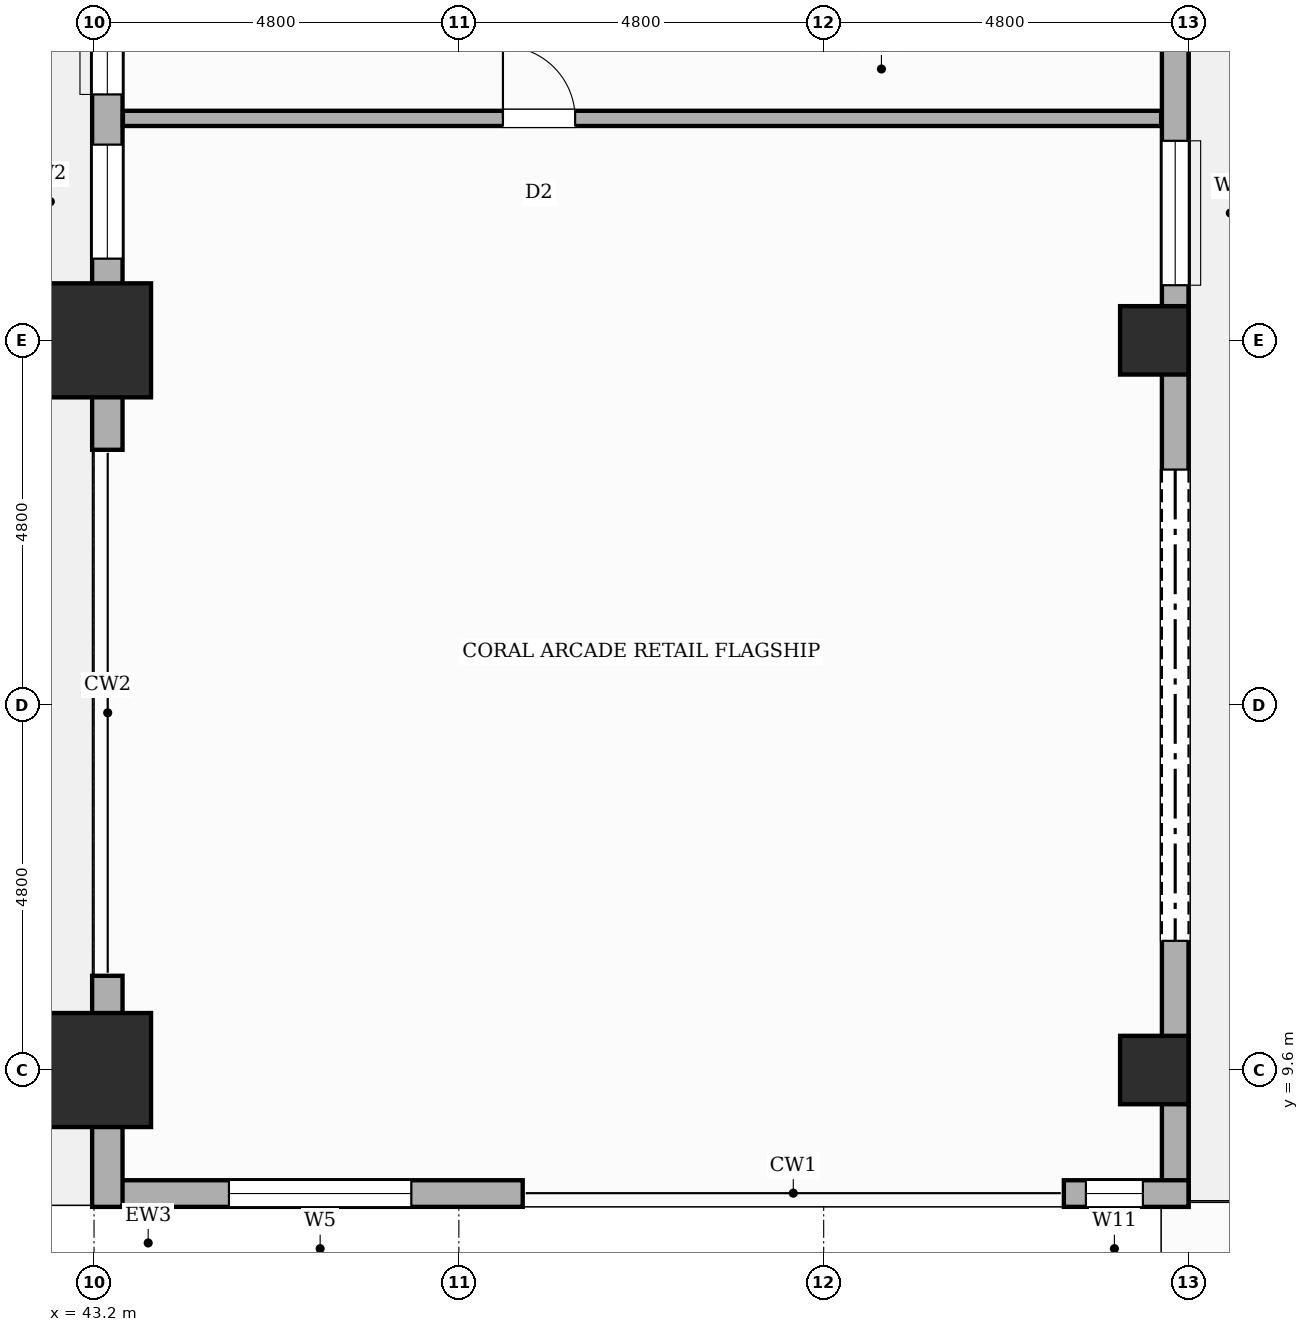
"""IFC4 building model, lengths in metres.
Left out: names, types, materials, properties, quantities, classifications, styles, units other than length and angle.
Written with IfcOpenShell. Run it as: python <this file> out.ifc"""

import sys

from ifc_helpers import new_model, si_unit, direction, frame, frame_2d, origin, origin_2d, place, context, subcontext, project, spatial, rectangle, circle, extrude, element, fill, save


model = new_model("IFC4")
c1 = context("Model", 3, precision=1e-05, world=origin(), true_north=direction((0.0, 1.0)))
c2 = subcontext(c1, "Body", "Model", "MODEL_VIEW")
j1 = project(units=[si_unit("LENGTHUNIT", "METRE"), si_unit("PLANEANGLEUNIT", "RADIAN")], contexts=[c1])
p1 = place(None, origin())
s1 = spatial("IfcSite", under=j1, at=p1, CompositionType="ELEMENT")
p2 = place(p1, origin())
s2 = spatial("IfcBuilding", under=s1, at=p2, CompositionType="ELEMENT")
p3 = place(p2, origin())
s3 = spatial("IfcBuildingStorey", under=s2, at=p3, CompositionType="ELEMENT", Elevation=0.0)
for number, where, z_axis, x_axis in (
    (1, (43.2, 9.6, 0.0), (0.0, 0.0, 1.0), (1.0, 0.0, 0.0)),
    (2, (43.2, 19.2, 0.0), (0.0, 0.0, 1.0), (1.0, 0.0, 0.0)),
):
    element("IfcColumn", number, at=place(p3, frame(where, z_axis=z_axis, x_axis=x_axis)), inside=s3, PredefinedType="USERDEFINED", context=c2, shape_type="SweptSolid", body=[
        extrude(rectangle(XDim=1.5, YDim=1.5, at=origin_2d()), origin(), (0.0, 0.0, 1.0), 5.2),
    ])
for number, where, z_axis, x_axis in (
    (3, (57.15, 9.6, 0.0), (0.0, 0.0, 1.0), (1.0, 0.0, 0.0)),
    (4, (57.15, 19.2, 0.0), (0.0, 0.0, 1.0), (1.0, 0.0, 0.0)),
):
    element("IfcColumn", number, at=place(p3, frame(where, z_axis=z_axis, x_axis=x_axis)), inside=s3, PredefinedType="COLUMN", context=c2, shape_type="SweptSolid", body=[
        extrude(circle(Radius=0.45, at=origin_2d()), origin(), (0.0, 0.0, 1.0), 5.2),
    ])
p4 = place(p3, frame((57.425, 48.0, 0.0), z_axis=(0.0, 0.0, 1.0), x_axis=(0.0, -1.0, 0.0)))
e5 = element("IfcWall", 5, at=p4, inside=s3, PredefinedType="STANDARD", context=c2, shape_type="SweptSolid", body=[
    extrude(rectangle(XDim=40.2, YDim=0.35, at=frame_2d((20.1, 0.0))), origin(), (0.0, 0.0, 1.0), 3.97),
])
p5 = place(p4, frame((30.5, 0.0, 0.0)))
e6 = element("IfcOpeningElement", 6, at=p5, cuts=e5, PredefinedType="OPENING", context=c2, shape_type="SweptSolid", body=[
    extrude(rectangle(XDim=6.2, YDim=3.4, at=frame_2d((3.1, 1.7))), frame((0.0, 0.185, 0.0), z_axis=(0.0, -1.0, 0.0), x_axis=(1.0, 0.0, 0.0)), (0.0, 0.0, 1.0), 0.37),
])
p6 = place(p4, frame((21.1, 0.0, 0.0)))
e7 = element("IfcOpeningElement", 7, at=p6, cuts=e5, PredefinedType="OPENING", context=c2, shape_type="SweptSolid", body=[
    extrude(rectangle(XDim=2.2, YDim=2.45, at=frame_2d((1.1, 1.225))), frame((0.0, 0.185, 0.0), z_axis=(0.0, -1.0, 0.0), x_axis=(1.0, 0.0, 0.0)), (0.0, 0.0, 1.0), 0.37),
])
p7 = place(p4, frame((12.2, 0.0, 0.85)))
e8 = element("IfcOpeningElement", 8, at=p7, cuts=e5, PredefinedType="OPENING", context=c2, shape_type="SweptSolid", body=[
    extrude(rectangle(XDim=1.5, YDim=2.1, at=frame_2d((0.75, 1.05))), frame((0.0, 0.185, 0.0), z_axis=(0.0, -1.0, 0.0), x_axis=(1.0, 0.0, 0.0)), (0.0, 0.0, 1.0), 0.37),
])
p8 = place(p4, frame((10.375, 0.0, 0.85)))
e9 = element("IfcOpeningElement", 9, at=p8, cuts=e5, PredefinedType="OPENING", context=c2, shape_type="SweptSolid", body=[
    extrude(rectangle(XDim=1.2, YDim=1.8, at=frame_2d((0.6, 0.9))), frame((0.0, 0.185, 0.0), z_axis=(0.0, -1.0, 0.0), x_axis=(1.0, 0.0, 0.0)), (0.0, 0.0, 1.0), 0.37),
])
p9 = place(p4, frame((1.675, 0.0, 0.85)))
e10 = element("IfcOpeningElement", 10, at=p9, cuts=e5, PredefinedType="OPENING", context=c2, shape_type="SweptSolid", body=[
    extrude(rectangle(XDim=1.9, YDim=2.6, at=frame_2d((0.95, 1.3))), frame((0.0, 0.185, 0.0), z_axis=(0.0, -1.0, 0.0), x_axis=(1.0, 0.0, 0.0)), (0.0, 0.0, 1.0), 0.37),
])
p10 = place(p4, frame((26.175, 0.0, 0.85)))
e11 = element("IfcOpeningElement", 11, at=p10, cuts=e5, PredefinedType="OPENING", context=c2, shape_type="SweptSolid", body=[
    extrude(rectangle(XDim=1.9, YDim=2.6, at=frame_2d((0.95, 1.3))), frame((0.0, 0.185, 0.0), z_axis=(0.0, -1.0, 0.0), x_axis=(1.0, 0.0, 0.0)), (0.0, 0.0, 1.0), 0.37),
])
p11 = place(p3, frame((57.6, 7.975, 0.0), z_axis=(0.0, 0.0, 1.0), x_axis=(-1.0, 0.0, 0.0)))
e12 = element("IfcWall", 12, at=p11, inside=s3, PredefinedType="STANDARD", context=c2, shape_type="SweptSolid", body=[
    extrude(rectangle(XDim=1.64, YDim=0.35, at=frame_2d((0.82, 0.0))), origin(), (0.0, 0.0, 1.0), 4.89),
])
p12 = place(p11, frame((0.6, 0.0, 0.45)))
e13 = element("IfcOpeningElement", 13, at=p12, cuts=e12, PredefinedType="OPENING", context=c2, shape_type="SweptSolid", body=[
    extrude(rectangle(XDim=0.75, YDim=1.8, at=frame_2d((0.375, 0.9))), frame((0.0, 0.185, 0.0), z_axis=(0.0, -1.0, 0.0), x_axis=(1.0, 0.0, 0.0)), (0.0, 0.0, 1.0), 0.37),
])
p13 = place(p3, frame((48.84, 7.975, 0.0), z_axis=(0.0, 0.0, 1.0), x_axis=(-1.0, 0.0, 0.0)))
e14 = element("IfcWall", 14, at=p13, inside=s3, PredefinedType="STANDARD", context=c2, shape_type="SweptSolid", body=[
    extrude(rectangle(XDim=5.64, YDim=0.35, at=frame_2d((2.82, 0.0))), origin(), (0.0, 0.0, 1.0), 4.89),
])
p14 = place(p13, frame((1.465, 0.0, 0.85)))
e15 = element("IfcOpeningElement", 15, at=p14, cuts=e14, PredefinedType="OPENING", context=c2, shape_type="SweptSolid", body=[
    extrude(rectangle(XDim=2.4, YDim=3.2, at=frame_2d((1.2, 1.6))), frame((0.0, 0.185, 0.0), z_axis=(0.0, -1.0, 0.0), x_axis=(1.0, 0.0, 0.0)), (0.0, 0.0, 1.0), 0.37),
])
p15 = place(p3, frame((43.375, 7.8, 0.0), z_axis=(0.0, 0.0, 1.0), x_axis=(0.0, 1.0, 0.0)))
e16 = element("IfcWall", 16, at=p15, inside=s3, PredefinedType="SOLIDWALL", context=c2, shape_type="SweptSolid", body=[
    extrude(rectangle(XDim=3.04, YDim=0.4, at=frame_2d((1.52, 0.0))), origin(), (0.0, 0.0, 1.0), 3.97),
])
p16 = place(p3, frame((43.375, 17.76, 0.0), z_axis=(0.0, 0.0, 1.0), x_axis=(0.0, 1.0, 0.0)))
e17 = element("IfcWall", 17, at=p16, inside=s3, PredefinedType="SOLIDWALL", context=c2, shape_type="SweptSolid", body=[
    extrude(rectangle(XDim=30.24, YDim=0.4, at=frame_2d((15.12, 0.0))), origin(), (0.0, 0.0, 1.0), 3.97),
])
p17 = place(p16, frame((6.94, 0.0, 0.0)))
e18 = element("IfcOpeningElement", 18, at=p17, cuts=e17, PredefinedType="OPENING", context=c2, shape_type="SweptSolid", body=[
    extrude(rectangle(XDim=2.2, YDim=2.45, at=frame_2d((1.1, 1.225))), frame((0.0, 0.21, 0.0), z_axis=(0.0, -1.0, 0.0), x_axis=(1.0, 0.0, 0.0)), (0.0, 0.0, 1.0), 0.42),
])
p18 = place(p16, frame((4.675, 0.0, 0.85)))
e19 = element("IfcOpeningElement", 19, at=p18, cuts=e17, PredefinedType="OPENING", context=c2, shape_type="SweptSolid", body=[
    extrude(rectangle(XDim=1.9, YDim=2.6, at=frame_2d((0.95, 1.3))), frame((0.0, 0.21, 0.0), z_axis=(0.0, -1.0, 0.0), x_axis=(1.0, 0.0, 0.0)), (0.0, 0.0, 1.0), 0.42),
])
p19 = place(p16, frame((2.515, 0.0, 0.85)))
e20 = element("IfcOpeningElement", 20, at=p19, cuts=e17, PredefinedType="OPENING", context=c2, shape_type="SweptSolid", body=[
    extrude(rectangle(XDim=1.5, YDim=2.1, at=frame_2d((0.75, 1.05))), frame((0.0, 0.21, 0.0), z_axis=(0.0, -1.0, 0.0), x_axis=(1.0, 0.0, 0.0)), (0.0, 0.0, 1.0), 0.42),
])
p20 = place(p3, frame((43.58, 22.12, 0.0), z_axis=(0.0, 0.0, 1.0), x_axis=(1.0, 0.0, 0.0)))
e21 = element("IfcWall", 21, at=p20, inside=s3, PredefinedType="SOLIDWALL", context=c2, shape_type="SweptSolid", body=[
    extrude(rectangle(XDim=13.66, YDim=0.2, at=frame_2d((6.83, 0.0))), origin(), (0.0, 0.0, 1.0), 4.89),
])
p21 = place(p20, frame((5.0, 0.0, 0.0)))
e22 = element("IfcOpeningElement", 22, at=p21, cuts=e21, PredefinedType="OPENING", context=c2, shape_type="SweptSolid", body=[
    extrude(rectangle(XDim=0.95, YDim=2.15, at=frame_2d((0.475, 1.075))), frame((0.0, 0.11, 0.0), z_axis=(0.0, -1.0, 0.0), x_axis=(1.0, 0.0, 0.0)), (0.0, 0.0, 1.0), 0.22),
])
p22 = place(p5, origin())
e23 = element("IfcDoor", 23, at=p22, inside=s3, OperationType="ROLLINGUP", PredefinedType="GATE", context=c2, shape_type="SweptSolid", body=[
    extrude(rectangle(XDim=6.2, YDim=3.4, at=frame_2d((3.1, 1.7))), frame((0.0, 0.025, 0.0), z_axis=(0.0, -1.0, 0.0), x_axis=(1.0, 0.0, 0.0)), (0.0, 0.0, 1.0), 0.05),
])
fill(e6, e23)
p23 = place(p10, origin())
e24 = element("IfcWindow", 24, at=p23, inside=s3, PartitioningType="SINGLE_PANEL", PredefinedType="WINDOW", context=c2, shape_type="SweptSolid", body=[
    extrude(rectangle(XDim=1.9, YDim=2.6, at=frame_2d((0.95, 1.3))), frame((0.0, 0.03, 0.0), z_axis=(0.0, -1.0, 0.0), x_axis=(1.0, 0.0, 0.0)), (0.0, 0.0, 1.0), 0.06),
])
fill(e11, e24)
p24 = place(p12, origin())
e25 = element("IfcWindow", 25, at=p24, inside=s3, PartitioningType="SINGLE_PANEL", PredefinedType="WINDOW", context=c2, shape_type="SweptSolid", body=[
    extrude(rectangle(XDim=0.75, YDim=1.8, at=frame_2d((0.375, 0.9))), frame((0.0, 0.03, 0.0), z_axis=(0.0, -1.0, 0.0), x_axis=(1.0, 0.0, 0.0)), (0.0, 0.0, 1.0), 0.06),
])
fill(e13, e25)
p25 = place(p14, origin())
e26 = element("IfcWindow", 26, at=p25, inside=s3, PartitioningType="SINGLE_PANEL", PredefinedType="WINDOW", context=c2, shape_type="SweptSolid", body=[
    extrude(rectangle(XDim=2.4, YDim=3.2, at=frame_2d((1.2, 1.6))), frame((0.0, 0.03, 0.0), z_axis=(0.0, -1.0, 0.0), x_axis=(1.0, 0.0, 0.0)), (0.0, 0.0, 1.0), 0.06),
])
fill(e15, e26)
p26 = place(p18, origin())
e27 = element("IfcWindow", 27, at=p26, inside=s3, PartitioningType="SINGLE_PANEL", PredefinedType="WINDOW", context=c2, shape_type="SweptSolid", body=[
    extrude(rectangle(XDim=1.9, YDim=2.6, at=frame_2d((0.95, 1.3))), frame((0.0, 0.03, 0.0), z_axis=(0.0, -1.0, 0.0), x_axis=(1.0, 0.0, 0.0)), (0.0, 0.0, 1.0), 0.06),
])
fill(e19, e27)
p27 = place(p19, origin())
e28 = element("IfcWindow", 28, at=p27, inside=s3, PartitioningType="SINGLE_PANEL", PredefinedType="WINDOW", context=c2, shape_type="SweptSolid", body=[
    extrude(rectangle(XDim=1.5, YDim=2.1, at=frame_2d((0.75, 1.05))), frame((0.0, 0.03, 0.0), z_axis=(0.0, -1.0, 0.0), x_axis=(1.0, 0.0, 0.0)), (0.0, 0.0, 1.0), 0.06),
])
fill(e20, e28)
p28 = place(p21, origin())
e29 = element("IfcDoor", 29, at=p28, inside=s3, OperationType="SINGLE_SWING_LEFT", PredefinedType="DOOR", context=c2, shape_type="SweptSolid", body=[
    extrude(rectangle(XDim=0.95, YDim=2.15, at=frame_2d((0.475, 1.075))), frame((0.0, 0.025, 0.0), z_axis=(0.0, -1.0, 0.0), x_axis=(1.0, 0.0, 0.0)), (0.0, 0.0, 1.0), 0.05),
])
fill(e22, e29)
save(model, sys.argv[1])
